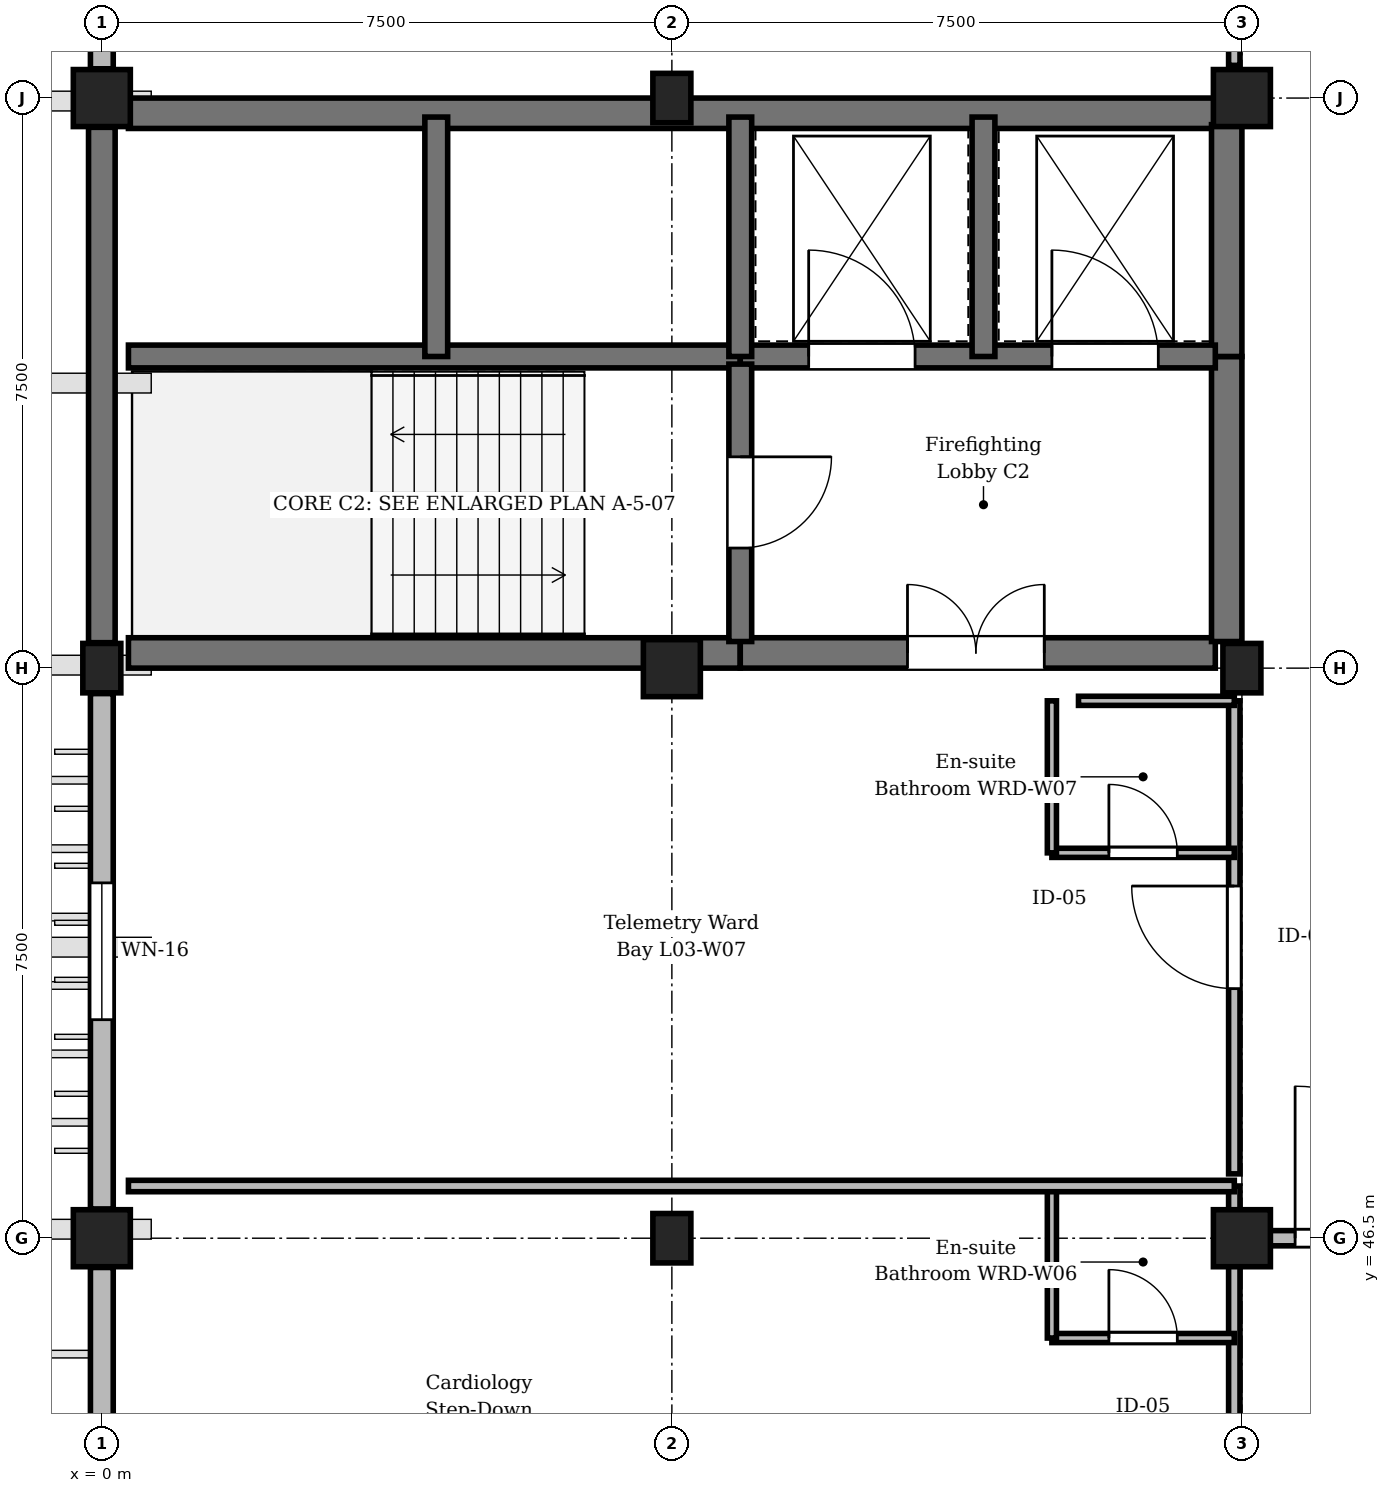
"""IFC4 building model, lengths in metres.
Left out: names, types, materials, properties, quantities, classifications, styles, units other than length and angle.
Written with IfcOpenShell. Run it as: python <this file> out.ifc"""

import sys

from ifc_helpers import new_model, si_unit, direction, frame, frame_2d, origin, origin_2d, place, context, subcontext, project, spatial, rectangle, extrude, element, fill, save


model = new_model("IFC4")
c1 = context("Model", 3, precision=1e-05, world=origin(), true_north=direction((0.0, 1.0)))
c2 = subcontext(c1, "Body", "Model", "MODEL_VIEW")
j1 = project(units=[si_unit("LENGTHUNIT", "METRE"), si_unit("PLANEANGLEUNIT", "RADIAN")], contexts=[c1])
p1 = place(None, origin())
s1 = spatial("IfcSite", under=j1, at=p1, CompositionType="ELEMENT")
p2 = place(p1, origin())
s2 = spatial("IfcBuilding", under=s1, at=p2, CompositionType="ELEMENT")
p3 = place(p2, frame((0.0, 0.0, 14.1)))
s3 = spatial("IfcBuildingStorey", under=s2, at=p3, CompositionType="ELEMENT", Elevation=14.1)
p4 = place(p3, frame((0.0, 46.5, 0.0), z_axis=(0.0, 0.0, 1.0), x_axis=(1.0, 0.0, 0.0)))
e1 = element("IfcColumn", 1, at=p4, inside=s3, PredefinedType="COLUMN", context=c2, shape_type="SweptSolid", body=[
    extrude(rectangle(XDim=0.75, YDim=0.75, at=origin_2d()), origin(), (0.0, 0.0, 1.0), 3.75),
])
p5 = place(p3, frame((0.0, 54.0, 0.0), z_axis=(0.0, 0.0, 1.0), x_axis=(1.0, 0.0, 0.0)))
e2 = element("IfcColumn", 2, at=p5, inside=s3, PredefinedType="COLUMN", context=c2, shape_type="SweptSolid", body=[
    extrude(rectangle(XDim=0.5, YDim=0.65, at=origin_2d()), origin(), (0.0, 0.0, 1.0), 3.75),
])
p6 = place(p3, frame((0.0, 61.5, 0.0), z_axis=(0.0, 0.0, 1.0), x_axis=(1.0, 0.0, 0.0)))
e3 = element("IfcColumn", 3, at=p6, inside=s3, PredefinedType="COLUMN", context=c2, shape_type="SweptSolid", body=[
    extrude(rectangle(XDim=0.75, YDim=0.75, at=origin_2d()), origin(), (0.0, 0.0, 1.0), 3.75),
])
p7 = place(p3, frame((7.5, 46.5, 0.0), z_axis=(0.0, 0.0, 1.0), x_axis=(1.0, 0.0, 0.0)))
e4 = element("IfcColumn", 4, at=p7, inside=s3, PredefinedType="COLUMN", context=c2, shape_type="SweptSolid", body=[
    extrude(rectangle(XDim=0.5, YDim=0.65, at=origin_2d()), origin(), (0.0, 0.0, 1.0), 3.75),
])
p8 = place(p3, frame((7.5, 54.0, 0.0), z_axis=(0.0, 0.0, 1.0), x_axis=(1.0, 0.0, 0.0)))
e5 = element("IfcColumn", 5, at=p8, inside=s3, PredefinedType="COLUMN", context=c2, shape_type="SweptSolid", body=[
    extrude(rectangle(XDim=0.75, YDim=0.75, at=origin_2d()), origin(), (0.0, 0.0, 1.0), 3.75),
])
p9 = place(p3, frame((7.5, 61.5, 0.0), z_axis=(0.0, 0.0, 1.0), x_axis=(1.0, 0.0, 0.0)))
e6 = element("IfcColumn", 6, at=p9, inside=s3, PredefinedType="COLUMN", context=c2, shape_type="SweptSolid", body=[
    extrude(rectangle(XDim=0.5, YDim=0.65, at=origin_2d()), origin(), (0.0, 0.0, 1.0), 3.75),
])
p10 = place(p3, frame((15.0, 46.5, 0.0), z_axis=(0.0, 0.0, 1.0), x_axis=(1.0, 0.0, 0.0)))
e7 = element("IfcColumn", 7, at=p10, inside=s3, PredefinedType="COLUMN", context=c2, shape_type="SweptSolid", body=[
    extrude(rectangle(XDim=0.75, YDim=0.75, at=origin_2d()), origin(), (0.0, 0.0, 1.0), 3.75),
])
p11 = place(p3, frame((15.0, 54.0, 0.0), z_axis=(0.0, 0.0, 1.0), x_axis=(1.0, 0.0, 0.0)))
e8 = element("IfcColumn", 8, at=p11, inside=s3, PredefinedType="COLUMN", context=c2, shape_type="SweptSolid", body=[
    extrude(rectangle(XDim=0.5, YDim=0.65, at=origin_2d()), origin(), (0.0, 0.0, 1.0), 3.75),
])
p12 = place(p3, frame((15.0, 61.5, 0.0), z_axis=(0.0, 0.0, 1.0), x_axis=(1.0, 0.0, 0.0)))
e9 = element("IfcColumn", 9, at=p12, inside=s3, PredefinedType="COLUMN", context=c2, shape_type="SweptSolid", body=[
    extrude(rectangle(XDim=0.75, YDim=0.75, at=origin_2d()), origin(), (0.0, 0.0, 1.0), 3.75),
])
p13 = place(p3, frame((0.0, 39.335, 0.0), z_axis=(0.0, 0.0, 1.0), x_axis=(0.0, 1.0, 0.0)))
e10 = element("IfcWall", 10, at=p13, inside=s3, PredefinedType="STANDARD", context=c2, shape_type="SweptSolid", body=[
    extrude(rectangle(XDim=6.78, YDim=0.3, at=frame_2d((3.39, 0.0))), origin(), (0.0, 0.0, 1.0), 2.87),
])
p14 = place(p13, frame((2.59, 0.0, 0.9)))
e11 = element("IfcOpeningElement", 11, at=p14, cuts=e10, PredefinedType="OPENING", context=c2, shape_type="SweptSolid", body=[
    extrude(rectangle(XDim=1.6, YDim=1.69, at=frame_2d((0.8, 0.845))), frame((0.0, 0.16, 0.0), z_axis=(0.0, -1.0, 0.0), x_axis=(1.0, 0.0, 0.0)), (0.0, 0.0, 1.0), 0.32),
])
p15 = place(p3, frame((0.0, 46.885, 0.0), z_axis=(0.0, 0.0, 1.0), x_axis=(0.0, 1.0, 0.0)))
e12 = element("IfcWall", 12, at=p15, inside=s3, PredefinedType="STANDARD", context=c2, shape_type="SweptSolid", body=[
    extrude(rectangle(XDim=6.78, YDim=0.3, at=frame_2d((3.39, 0.0))), origin(), (0.0, 0.0, 1.0), 2.87),
])
p16 = place(p15, frame((2.49, 0.0, 0.9)))
e13 = element("IfcOpeningElement", 13, at=p16, cuts=e12, PredefinedType="OPENING", context=c2, shape_type="SweptSolid", body=[
    extrude(rectangle(XDim=1.8, YDim=1.69, at=frame_2d((0.9, 0.845))), frame((0.0, 0.16, 0.0), z_axis=(0.0, -1.0, 0.0), x_axis=(1.0, 0.0, 0.0)), (0.0, 0.0, 1.0), 0.32),
])
p17 = place(p3, frame((0.0, 54.335, 0.0), z_axis=(0.0, 0.0, 1.0), x_axis=(0.0, 1.0, 0.0)))
e14 = element("IfcWall", 14, at=p17, inside=s3, PredefinedType="SHEAR", context=c2, shape_type="SweptSolid", body=[
    extrude(rectangle(XDim=6.78, YDim=0.35, at=frame_2d((3.39, 0.0))), origin(), (0.0, 0.0, 1.0), 3.47),
])
p18 = place(p3, frame((0.0, 61.885, 0.0), z_axis=(0.0, 0.0, 1.0), x_axis=(0.0, 1.0, 0.0)))
e15 = element("IfcWall", 15, at=p18, inside=s3, PredefinedType="STANDARD", context=c2, shape_type="SweptSolid", body=[
    extrude(rectangle(XDim=6.78, YDim=0.3, at=frame_2d((3.39, 0.0))), origin(), (0.0, 0.0, 1.0), 2.87),
])
p19 = place(p18, frame((2.64, 0.0, 0.9)))
e16 = element("IfcOpeningElement", 16, at=p19, cuts=e15, PredefinedType="OPENING", context=c2, shape_type="SweptSolid", body=[
    extrude(rectangle(XDim=1.5, YDim=1.69, at=frame_2d((0.75, 0.845))), frame((0.0, 0.16, 0.0), z_axis=(0.0, -1.0, 0.0), x_axis=(1.0, 0.0, 0.0)), (0.0, 0.0, 1.0), 0.32),
])
p20 = place(p3, frame((0.35, 54.2, 0.0), z_axis=(0.0, 0.0, 1.0), x_axis=(1.0, 0.0, 0.0)))
e17 = element("IfcWall", 17, at=p20, inside=s3, PredefinedType="SHEAR", context=c2, shape_type="SweptSolid", body=[
    extrude(rectangle(XDim=8.05, YDim=0.4, at=frame_2d((4.025, 0.0))), origin(), (0.0, 0.0, 1.0), 3.47),
])
p21 = place(p3, frame((8.4, 54.2, 0.0), z_axis=(0.0, 0.0, 1.0), x_axis=(1.0, 0.0, 0.0)))
e18 = element("IfcWall", 18, at=p21, inside=s3, PredefinedType="SHEAR", context=c2, shape_type="SweptSolid", body=[
    extrude(rectangle(XDim=6.25, YDim=0.4, at=frame_2d((3.125, 0.0))), origin(), (0.0, 0.0, 1.0), 3.47),
])
p22 = place(p21, frame((2.2, 0.0, 0.0)))
e19 = element("IfcOpeningElement", 19, at=p22, cuts=e18, PredefinedType="OPENING", context=c2, shape_type="SweptSolid", body=[
    extrude(rectangle(XDim=1.8, YDim=2.25, at=frame_2d((0.9, 1.125))), frame((0.0, 0.21, 0.0), z_axis=(0.0, -1.0, 0.0), x_axis=(1.0, 0.0, 0.0)), (0.0, 0.0, 1.0), 0.42),
])
p23 = place(p3, frame((0.35, 61.3, 0.0), z_axis=(0.0, 0.0, 1.0), x_axis=(1.0, 0.0, 0.0)))
e20 = element("IfcWall", 20, at=p23, inside=s3, PredefinedType="SHEAR", context=c2, shape_type="SweptSolid", body=[
    extrude(rectangle(XDim=14.3, YDim=0.4, at=frame_2d((7.15, 0.0))), origin(), (0.0, 0.0, 1.0), 3.47),
])
p24 = place(p3, frame((14.8, 54.35, 0.0), z_axis=(0.0, 0.0, 1.0), x_axis=(0.0, 1.0, 0.0)))
e21 = element("IfcWall", 21, at=p24, inside=s3, PredefinedType="SHEAR", context=c2, shape_type="SweptSolid", body=[
    extrude(rectangle(XDim=3.75, YDim=0.4, at=frame_2d((1.875, 0.0))), origin(), (0.0, 0.0, 1.0), 3.47),
])
p25 = place(p3, frame((14.8, 58.1, 0.0), z_axis=(0.0, 0.0, 1.0), x_axis=(0.0, 1.0, 0.0)))
e22 = element("IfcWall", 22, at=p25, inside=s3, PredefinedType="SHEAR", context=c2, shape_type="SweptSolid", body=[
    extrude(rectangle(XDim=3.05, YDim=0.4, at=frame_2d((1.525, 0.0))), origin(), (0.0, 0.0, 1.0), 3.47),
])
p26 = place(p3, frame((0.35, 58.1, 0.0), z_axis=(0.0, 0.0, 1.0), x_axis=(1.0, 0.0, 0.0)))
e23 = element("IfcWall", 23, at=p26, inside=s3, PredefinedType="SHEAR", context=c2, shape_type="SweptSolid", body=[
    extrude(rectangle(XDim=8.05, YDim=0.3, at=frame_2d((4.025, 0.0))), origin(), (0.0, 0.0, 1.0), 3.47),
])
p27 = place(p3, frame((8.4, 58.1, 0.0), z_axis=(0.0, 0.0, 1.0), x_axis=(1.0, 0.0, 0.0)))
e24 = element("IfcWall", 24, at=p27, inside=s3, PredefinedType="SHEAR", context=c2, shape_type="SweptSolid", body=[
    extrude(rectangle(XDim=6.25, YDim=0.3, at=frame_2d((3.125, 0.0))), origin(), (0.0, 0.0, 1.0), 3.47),
])
p28 = place(p27, frame((0.9, 0.0, 0.0)))
e25 = element("IfcOpeningElement", 25, at=p28, cuts=e24, PredefinedType="OPENING", context=c2, shape_type="SweptSolid", body=[
    extrude(rectangle(XDim=1.4, YDim=2.25, at=frame_2d((0.7, 1.125))), frame((0.0, 0.16, 0.0), z_axis=(0.0, -1.0, 0.0), x_axis=(1.0, 0.0, 0.0)), (0.0, 0.0, 1.0), 0.32),
])
p29 = place(p27, frame((4.1, 0.0, 0.0)))
e26 = element("IfcOpeningElement", 26, at=p29, cuts=e24, PredefinedType="OPENING", context=c2, shape_type="SweptSolid", body=[
    extrude(rectangle(XDim=1.4, YDim=2.25, at=frame_2d((0.7, 1.125))), frame((0.0, 0.16, 0.0), z_axis=(0.0, -1.0, 0.0), x_axis=(1.0, 0.0, 0.0)), (0.0, 0.0, 1.0), 0.32),
])
p30 = place(p3, frame((8.4, 58.0, 0.0), z_axis=(0.0, 0.0, 1.0), x_axis=(0.0, -1.0, 0.0)))
e27 = element("IfcWall", 27, at=p30, inside=s3, PredefinedType="SHEAR", context=c2, shape_type="SweptSolid", body=[
    extrude(rectangle(XDim=3.65, YDim=0.3, at=frame_2d((1.825, 0.0))), origin(), (0.0, 0.0, 1.0), 3.47),
])
p31 = place(p30, frame((1.22, 0.0, 0.0)))
e28 = element("IfcOpeningElement", 28, at=p31, cuts=e27, PredefinedType="OPENING", context=c2, shape_type="SweptSolid", body=[
    extrude(rectangle(XDim=1.2, YDim=2.25, at=frame_2d((0.6, 1.125))), frame((0.0, 0.16, 0.0), z_axis=(0.0, -1.0, 0.0), x_axis=(1.0, 0.0, 0.0)), (0.0, 0.0, 1.0), 0.32),
])
for number, where, z_axis, x_axis in (
    (29, (4.4, 58.1, 0.0), (0.0, 0.0, 1.0), (0.0, 1.0, 0.0)),
    (30, (8.4, 58.1, 0.0), (0.0, 0.0, 1.0), (0.0, 1.0, 0.0)),
    (31, (11.6, 58.1, 0.0), (0.0, 0.0, 1.0), (0.0, 1.0, 0.0)),
):
    element("IfcWall", number, at=place(p3, frame(where, z_axis=z_axis, x_axis=x_axis)), inside=s3, PredefinedType="SHEAR", context=c2, shape_type="SweptSolid", body=[
        extrude(rectangle(XDim=3.15, YDim=0.3, at=frame_2d((1.575, 0.0))), origin(), (0.0, 0.0, 1.0), 3.47),
    ])
p32 = place(p3, frame((14.9, 40.963, 0.0), z_axis=(0.0, 0.0, 1.0), x_axis=(0.0, 1.0, 0.0)))
e32 = element("IfcWall", 32, at=p32, inside=s3, PredefinedType="PARTITIONING", context=c2, shape_type="SweptSolid", body=[
    extrude(rectangle(XDim=6.223, YDim=0.15, at=frame_2d((3.112, 0.0))), origin(), (0.0, 0.0, 1.0), 2.905),
])
p33 = place(p32, frame((1.125, 0.0, 0.0)))
e33 = element("IfcOpeningElement", 33, at=p33, cuts=e32, PredefinedType="OPENING", context=c2, shape_type="SweptSolid", body=[
    extrude(rectangle(XDim=1.35, YDim=2.25, at=frame_2d((0.675, 1.125))), frame((0.0, 0.085, 0.0), z_axis=(0.0, -1.0, 0.0), x_axis=(1.0, 0.0, 0.0)), (0.0, 0.0, 1.0), 0.17),
])
p34 = place(p3, frame((12.5, 45.187, 0.0), z_axis=(0.0, 0.0, 1.0), x_axis=(1.0, 0.0, 0.0)))
e34 = element("IfcWall", 34, at=p34, inside=s3, PredefinedType="PARTITIONING", context=c2, shape_type="SweptSolid", body=[
    extrude(rectangle(XDim=2.4, YDim=0.12, at=frame_2d((1.2, 0.0))), origin(), (0.0, 0.0, 1.0), 3.455),
])
p35 = place(p34, frame((0.75, 0.0, 0.0)))
e35 = element("IfcOpeningElement", 35, at=p35, cuts=e34, PredefinedType="OPENING", context=c2, shape_type="SweptSolid", body=[
    extrude(rectangle(XDim=0.9, YDim=2.1, at=frame_2d((0.45, 1.05))), frame((0.0, 0.07, 0.0), z_axis=(0.0, -1.0, 0.0), x_axis=(1.0, 0.0, 0.0)), (0.0, 0.0, 1.0), 0.14),
])
p36 = place(p3, frame((12.5, 45.187, 0.0), z_axis=(0.0, 0.0, 1.0), x_axis=(0.0, 1.0, 0.0)))
e36 = element("IfcWall", 36, at=p36, inside=s3, PredefinedType="PARTITIONING", context=c2, shape_type="SweptSolid", body=[
    extrude(rectangle(XDim=2.0, YDim=0.12, at=frame_2d((1.0, 0.0))), origin(), (0.0, 0.0, 1.0), 3.455),
])
p37 = place(p3, frame((14.9, 47.347, 0.0), z_axis=(0.0, 0.0, 1.0), x_axis=(0.0, 1.0, 0.0)))
e37 = element("IfcWall", 37, at=p37, inside=s3, PredefinedType="PARTITIONING", context=c2, shape_type="SweptSolid", body=[
    extrude(rectangle(XDim=6.223, YDim=0.15, at=frame_2d((3.112, 0.0))), origin(), (0.0, 0.0, 1.0), 2.905),
])
p38 = place(p37, frame((2.437, 0.0, 0.0)))
e38 = element("IfcOpeningElement", 38, at=p38, cuts=e37, PredefinedType="OPENING", context=c2, shape_type="SweptSolid", body=[
    extrude(rectangle(XDim=1.35, YDim=2.25, at=frame_2d((0.675, 1.125))), frame((0.0, 0.085, 0.0), z_axis=(0.0, -1.0, 0.0), x_axis=(1.0, 0.0, 0.0)), (0.0, 0.0, 1.0), 0.17),
])
p39 = place(p3, frame((12.5, 51.57, 0.0), z_axis=(0.0, 0.0, 1.0), x_axis=(1.0, 0.0, 0.0)))
e39 = element("IfcWall", 39, at=p39, inside=s3, PredefinedType="PARTITIONING", context=c2, shape_type="SweptSolid", body=[
    extrude(rectangle(XDim=2.4, YDim=0.12, at=frame_2d((1.2, 0.0))), origin(), (0.0, 0.0, 1.0), 3.455),
])
p40 = place(p39, frame((0.75, 0.0, 0.0)))
e40 = element("IfcOpeningElement", 40, at=p40, cuts=e39, PredefinedType="OPENING", context=c2, shape_type="SweptSolid", body=[
    extrude(rectangle(XDim=0.9, YDim=2.1, at=frame_2d((0.45, 1.05))), frame((0.0, 0.07, 0.0), z_axis=(0.0, -1.0, 0.0), x_axis=(1.0, 0.0, 0.0)), (0.0, 0.0, 1.0), 0.14),
])
p41 = place(p3, frame((12.5, 51.57, 0.0), z_axis=(0.0, 0.0, 1.0), x_axis=(0.0, 1.0, 0.0)))
e41 = element("IfcWall", 41, at=p41, inside=s3, PredefinedType="PARTITIONING", context=c2, shape_type="SweptSolid", body=[
    extrude(rectangle(XDim=2.0, YDim=0.12, at=frame_2d((1.0, 0.0))), origin(), (0.0, 0.0, 1.0), 3.455),
])
p42 = place(p3, frame((14.9, 61.93, 0.0), z_axis=(0.0, 0.0, 1.0), x_axis=(0.0, 1.0, 0.0)))
e42 = element("IfcWall", 42, at=p42, inside=s3, PredefinedType="PARTITIONING", context=c2, shape_type="SweptSolid", body=[
    extrude(rectangle(XDim=7.54, YDim=0.15, at=frame_2d((3.77, 0.0))), origin(), (0.0, 0.0, 1.0), 2.905),
])
p43 = place(p42, frame((2.526, 0.0, 0.0)))
e43 = element("IfcOpeningElement", 43, at=p43, cuts=e42, PredefinedType="OPENING", context=c2, shape_type="SweptSolid", body=[
    extrude(rectangle(XDim=1.35, YDim=2.25, at=frame_2d((0.675, 1.125))), frame((0.0, 0.085, 0.0), z_axis=(0.0, -1.0, 0.0), x_axis=(1.0, 0.0, 0.0)), (0.0, 0.0, 1.0), 0.17),
])
p44 = place(p3, frame((0.35, 47.187, 0.0), z_axis=(0.0, 0.0, 1.0), x_axis=(1.0, 0.0, 0.0)))
e44 = element("IfcWall", 44, at=p44, inside=s3, PredefinedType="PARTITIONING", context=c2, shape_type="SweptSolid", body=[
    extrude(rectangle(XDim=14.55, YDim=0.15, at=frame_2d((7.275, 0.0))), origin(), (0.0, 0.0, 1.0), 3.455),
])
p45 = place(p3, frame((12.85, 53.57, 0.0), z_axis=(0.0, 0.0, 1.0), x_axis=(1.0, 0.0, 0.0)))
e45 = element("IfcWall", 45, at=p45, inside=s3, PredefinedType="PARTITIONING", context=c2, shape_type="SweptSolid", body=[
    extrude(rectangle(XDim=2.05, YDim=0.12, at=frame_2d((1.025, 0.0))), origin(), (0.0, 0.0, 1.0), 3.455),
])
p46 = place(p3, frame((15.2, 46.5, 0.0), z_axis=(0.0, 0.0, 1.0), x_axis=(1.0, 0.0, 0.0)))
e46 = element("IfcWall", 46, at=p46, inside=s3, PredefinedType="STANDARD", context=c2, shape_type="SweptSolid", body=[
    extrude(rectangle(XDim=3.0, YDim=0.2, at=frame_2d((1.5, 0.0))), origin(), (0.0, 0.0, 1.0), 2.855),
])
p47 = place(p46, frame((0.5, 0.0, 0.0)))
e47 = element("IfcOpeningElement", 47, at=p47, cuts=e46, PredefinedType="OPENING", context=c2, shape_type="SweptSolid", body=[
    extrude(rectangle(XDim=2.0, YDim=2.3, at=frame_2d((1.0, 1.15))), frame((0.0, 0.11, 0.0), z_axis=(0.0, -1.0, 0.0), x_axis=(1.0, 0.0, 0.0)), (0.0, 0.0, 1.0), 0.22),
])
p48 = place(p16, origin())
e48 = element("IfcWindow", 48, at=p48, inside=s3, PartitioningType="SINGLE_PANEL", PredefinedType="WINDOW", context=c2, shape_type="SweptSolid", body=[
    extrude(rectangle(XDim=1.8, YDim=1.69, at=frame_2d((0.9, 0.845))), frame((0.0, 0.03, 0.0), z_axis=(0.0, -1.0, 0.0), x_axis=(1.0, 0.0, 0.0)), (0.0, 0.0, 1.0), 0.06),
])
fill(e13, e48)
p49 = place(p22, origin())
e49 = element("IfcDoor", 49, at=p49, inside=s3, OperationType="DOUBLE_DOOR_SINGLE_SWING", PredefinedType="DOOR", context=c2, shape_type="SweptSolid", body=[
    extrude(rectangle(XDim=1.8, YDim=2.25, at=frame_2d((0.9, 1.125))), frame((0.0, 0.025, 0.0), z_axis=(0.0, -1.0, 0.0), x_axis=(1.0, 0.0, 0.0)), (0.0, 0.0, 1.0), 0.05),
])
fill(e19, e49)
p50 = place(p28, origin())
e50 = element("IfcDoor", 50, at=p50, inside=s3, OperationType="DOUBLE_DOOR_SLIDING", PredefinedType="DOOR", context=c2, shape_type="SweptSolid", body=[
    extrude(rectangle(XDim=1.4, YDim=2.25, at=frame_2d((0.7, 1.125))), frame((0.0, 0.025, 0.0), z_axis=(0.0, -1.0, 0.0), x_axis=(1.0, 0.0, 0.0)), (0.0, 0.0, 1.0), 0.05),
])
fill(e25, e50)
p51 = place(p29, origin())
e51 = element("IfcDoor", 51, at=p51, inside=s3, OperationType="DOUBLE_DOOR_SLIDING", PredefinedType="DOOR", context=c2, shape_type="SweptSolid", body=[
    extrude(rectangle(XDim=1.4, YDim=2.25, at=frame_2d((0.7, 1.125))), frame((0.0, 0.025, 0.0), z_axis=(0.0, -1.0, 0.0), x_axis=(1.0, 0.0, 0.0)), (0.0, 0.0, 1.0), 0.05),
])
fill(e26, e51)
p52 = place(p31, origin())
e52 = element("IfcDoor", 52, at=p52, inside=s3, OperationType="SINGLE_SWING_LEFT", PredefinedType="DOOR", context=c2, shape_type="SweptSolid", body=[
    extrude(rectangle(XDim=1.2, YDim=2.25, at=frame_2d((0.6, 1.125))), frame((0.0, 0.025, 0.0), z_axis=(0.0, -1.0, 0.0), x_axis=(1.0, 0.0, 0.0)), (0.0, 0.0, 1.0), 0.05),
])
fill(e28, e52)
p53 = place(p35, origin())
e53 = element("IfcDoor", 53, at=p53, inside=s3, OperationType="SINGLE_SWING_LEFT", PredefinedType="DOOR", context=c2, shape_type="SweptSolid", body=[
    extrude(rectangle(XDim=0.9, YDim=2.1, at=frame_2d((0.45, 1.05))), frame((0.0, 0.025, 0.0), z_axis=(0.0, -1.0, 0.0), x_axis=(1.0, 0.0, 0.0)), (0.0, 0.0, 1.0), 0.05),
])
fill(e35, e53)
p54 = place(p38, origin())
e54 = element("IfcDoor", 54, at=p54, inside=s3, OperationType="SINGLE_SWING_RIGHT", PredefinedType="DOOR", context=c2, shape_type="SweptSolid", body=[
    extrude(rectangle(XDim=1.35, YDim=2.25, at=frame_2d((0.675, 1.125))), frame((0.0, 0.025, 0.0), z_axis=(0.0, -1.0, 0.0), x_axis=(1.0, 0.0, 0.0)), (0.0, 0.0, 1.0), 0.05),
])
fill(e38, e54)
p55 = place(p40, origin())
e55 = element("IfcDoor", 55, at=p55, inside=s3, OperationType="SINGLE_SWING_LEFT", PredefinedType="DOOR", context=c2, shape_type="SweptSolid", body=[
    extrude(rectangle(XDim=0.9, YDim=2.1, at=frame_2d((0.45, 1.05))), frame((0.0, 0.025, 0.0), z_axis=(0.0, -1.0, 0.0), x_axis=(1.0, 0.0, 0.0)), (0.0, 0.0, 1.0), 0.05),
])
fill(e40, e55)
p56 = place(p47, origin())
e56 = element("IfcDoor", 56, at=p56, inside=s3, OperationType="DOUBLE_DOOR_SINGLE_SWING", PredefinedType="DOOR", context=c2, shape_type="SweptSolid", body=[
    extrude(rectangle(XDim=2.0, YDim=2.3, at=frame_2d((1.0, 1.15))), frame((0.0, 0.025, 0.0), z_axis=(0.0, -1.0, 0.0), x_axis=(1.0, 0.0, 0.0)), (0.0, 0.0, 1.0), 0.05),
])
fill(e47, e56)
save(model, sys.argv[1])
